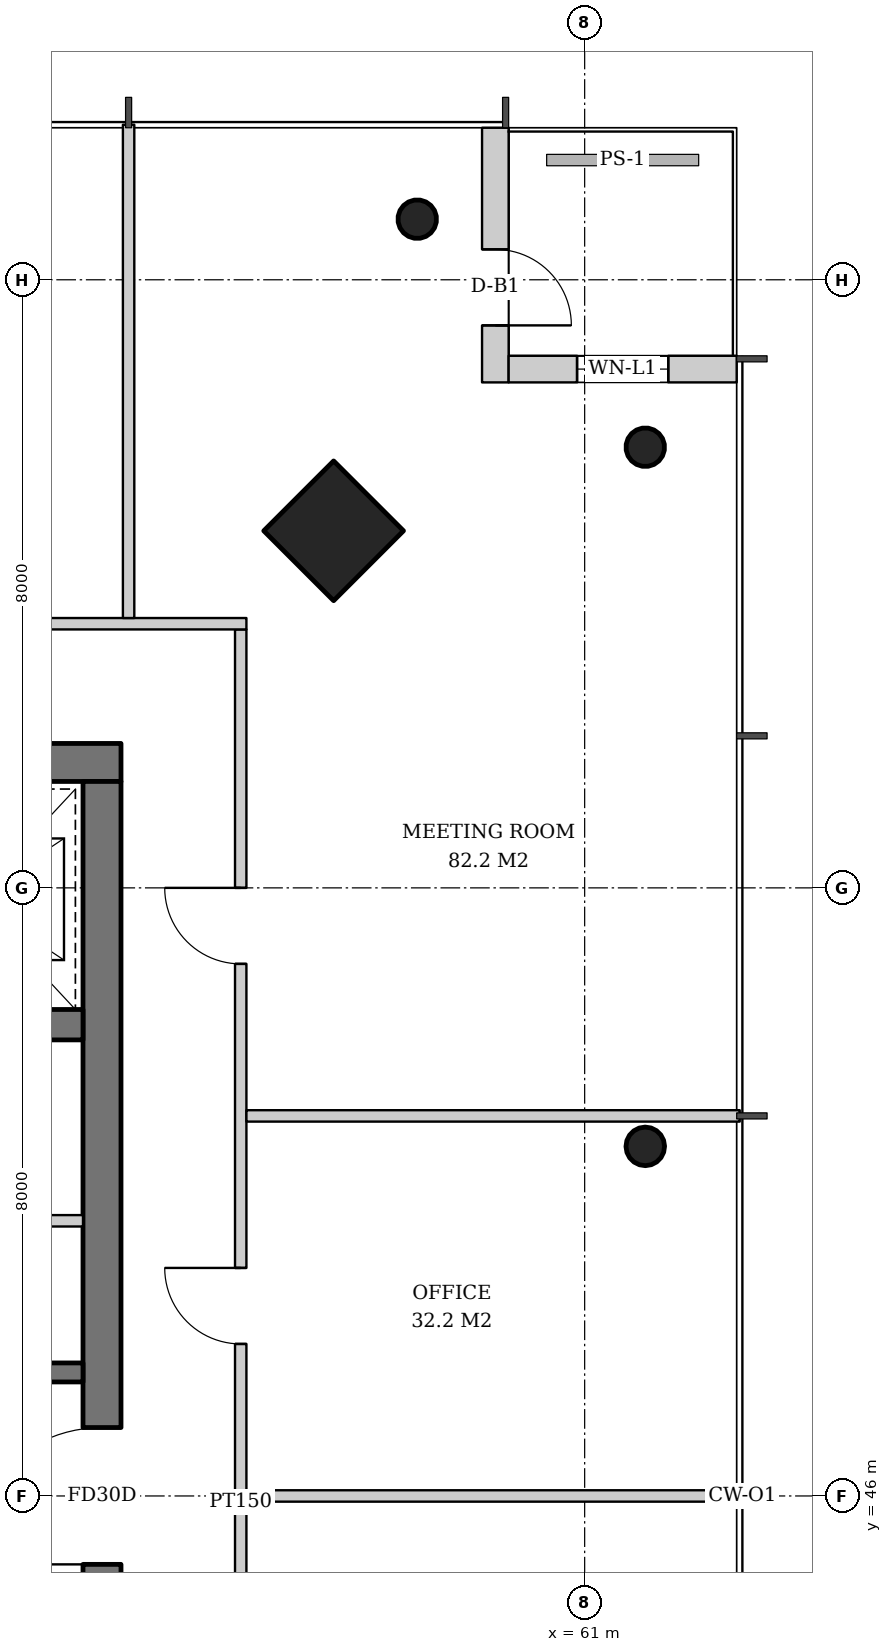
"""IFC4 building model, lengths in metres.
Left out: names, types, materials, properties, quantities, classifications, styles, units other than length and angle.
Written with IfcOpenShell. Run it as: python <this file> out.ifc"""

import sys

from ifc_helpers import new_model, si_unit, direction, frame, frame_2d, origin, origin_2d, place, context, subcontext, project, spatial, rectangle, hollow_circle, extrude, element, fill, save


model = new_model("IFC4")
c1 = context("Model", 3, precision=1e-05, world=origin(), true_north=direction((0.0, 1.0)))
c2 = subcontext(c1, "Body", "Model", "MODEL_VIEW")
j1 = project(units=[si_unit("LENGTHUNIT", "METRE"), si_unit("PLANEANGLEUNIT", "RADIAN")], contexts=[c1])
p1 = place(None, origin())
s1 = spatial("IfcSite", under=j1, at=p1, CompositionType="ELEMENT")
p2 = place(p1, origin())
s2 = spatial("IfcBuilding", under=s1, at=p2, CompositionType="ELEMENT")
p3 = place(p2, frame((0.0, 0.0, 245.2)))
s3 = spatial("IfcBuildingStorey", under=s2, at=p3, CompositionType="ELEMENT", Elevation=245.2)
p4 = place(p3, frame((57.736, 58.736, 0.0), z_axis=(-0.031898107953, -0.031898107953, 0.998981992539), x_axis=(0.707106781187, -0.707106781187, 0.0)))
e1 = element("IfcColumn", 1, at=p4, inside=s3, PredefinedType="COLUMN", context=c2, shape_type="SweptSolid", body=[
    extrude(rectangle(XDim=1.3, YDim=1.3, at=origin_2d()), origin(), (0.0, 0.0, 1.0), 3.804),
])
p5 = place(p3, frame((61.836, 59.836, 0.0), z_axis=(-0.031898107953, -0.031898107953, 0.998981992539), x_axis=(0.707106781187, -0.707106781187, 0.0)))
e2 = element("IfcColumn", 2, at=p5, inside=s3, PredefinedType="COLUMN", context=c2, shape_type="SweptSolid", body=[
    extrude(hollow_circle(Radius=0.254, WallThickness=0.02, at=origin_2d()), origin(), (0.0, 0.0, 1.0), 3.804),
])
p6 = place(p3, frame((61.836, 50.612, 0.0), z_axis=(-0.031912557129, -0.010594712125, 0.999434510497), x_axis=(0.315081783451, -0.949064523485, 0.0)))
e3 = element("IfcColumn", 3, at=p6, inside=s3, PredefinedType="COLUMN", context=c2, shape_type="SweptSolid", body=[
    extrude(hollow_circle(Radius=0.254, WallThickness=0.02, at=origin_2d()), origin(), (0.0, 0.0, 1.0), 3.802),
])
p7 = place(p3, frame((58.836, 62.836, 0.0), z_axis=(-0.031898107953, -0.031898107953, 0.998981992539), x_axis=(0.707106781187, -0.707106781187, 0.0)))
e4 = element("IfcColumn", 4, at=p7, inside=s3, PredefinedType="COLUMN", context=c2, shape_type="SweptSolid", body=[
    extrude(hollow_circle(Radius=0.254, WallThickness=0.02, at=origin_2d()), origin(), (0.0, 0.0, 1.0), 3.804),
])
p8 = place(p3, frame((35.1, 55.65, 0.0), z_axis=(0.0, 0.0, 1.0), x_axis=(1.0, 0.0, 0.0)))
e5 = element("IfcWall", 5, at=p8, inside=s3, PredefinedType="SHEAR", context=c2, shape_type="SweptSolid", body=[
    extrude(rectangle(XDim=19.8, YDim=0.5, at=frame_2d((9.9, 0.0))), origin(), (0.0, 0.0, 1.0), 3.8),
])
p9 = place(p8, frame((14.54, 0.0, 0.0)))
e6 = element("IfcOpeningElement", 6, at=p9, cuts=e5, PredefinedType="OPENING", context=c2, shape_type="SweptSolid", body=[
    extrude(rectangle(XDim=1.0, YDim=2.1, at=frame_2d((0.5, 1.05))), frame((0.0, 0.26, 0.0), z_axis=(0.0, -1.0, 0.0), x_axis=(1.0, 0.0, 0.0)), (0.0, 0.0, 1.0), 0.52),
])
p10 = place(p8, frame((0.96, 0.0, 0.0)))
e7 = element("IfcOpeningElement", 7, at=p10, cuts=e5, PredefinedType="OPENING", context=c2, shape_type="SweptSolid", body=[
    extrude(rectangle(XDim=1.0, YDim=2.1, at=frame_2d((0.5, 1.05))), frame((0.0, 0.26, 0.0), z_axis=(0.0, -1.0, 0.0), x_axis=(1.0, 0.0, 0.0)), (0.0, 0.0, 1.0), 0.52),
])
p11 = place(p8, frame((3.23, 0.0, 0.0)))
e8 = element("IfcOpeningElement", 8, at=p11, cuts=e5, PredefinedType="OPENING", context=c2, shape_type="SweptSolid", body=[
    extrude(rectangle(XDim=1.0, YDim=2.1, at=frame_2d((0.5, 1.05))), frame((0.0, 0.26, 0.0), z_axis=(0.0, -1.0, 0.0), x_axis=(1.0, 0.0, 0.0)), (0.0, 0.0, 1.0), 0.52),
])
p12 = place(p3, frame((54.65, 36.6, 0.0), z_axis=(0.0, 0.0, 1.0), x_axis=(0.0, 1.0, 0.0)))
e9 = element("IfcWall", 9, at=p12, inside=s3, PredefinedType="SHEAR", context=c2, shape_type="SweptSolid", body=[
    extrude(rectangle(XDim=18.8, YDim=0.5, at=frame_2d((9.4, 0.0))), origin(), (0.0, 0.0, 1.0), 3.8),
])
p13 = place(p12, frame((8.5, 0.0, 0.0)))
e10 = element("IfcOpeningElement", 10, at=p13, cuts=e9, PredefinedType="OPENING", context=c2, shape_type="SweptSolid", body=[
    extrude(rectangle(XDim=1.8, YDim=2.4, at=frame_2d((0.9, 1.2))), frame((0.0, 0.26, 0.0), z_axis=(0.0, -1.0, 0.0), x_axis=(1.0, 0.0, 0.0)), (0.0, 0.0, 1.0), 0.52),
])
p14 = place(p3, frame((35.6, 52.2, 0.0), z_axis=(0.0, 0.0, 1.0), x_axis=(1.0, 0.0, 0.0)))
e11 = element("IfcWall", 11, at=p14, inside=s3, PredefinedType="SHEAR", context=c2, shape_type="SweptSolid", body=[
    extrude(rectangle(XDim=18.8, YDim=0.4, at=frame_2d((9.4, 0.0))), origin(), (0.0, 0.0, 1.0), 3.8),
])
p15 = place(p3, frame((59.825, 64.0, 0.0), z_axis=(0.0, 0.0, 1.0), x_axis=(0.0, -1.0, 0.0)))
e12 = element("IfcWall", 12, at=p15, inside=s3, PredefinedType="SOLIDWALL", context=c2, shape_type="SweptSolid", body=[
    extrude(rectangle(XDim=3.35, YDim=0.35, at=frame_2d((1.675, 0.0))), origin(), (0.0, 0.0, 1.0), 3.62),
])
p16 = place(p15, frame((1.6, 0.0, 0.0)))
e13 = element("IfcOpeningElement", 13, at=p16, cuts=e12, PredefinedType="OPENING", context=c2, shape_type="SweptSolid", body=[
    extrude(rectangle(XDim=1.0, YDim=2.4, at=frame_2d((0.5, 1.2))), frame((0.0, 0.185, 0.0), z_axis=(0.0, -1.0, 0.0), x_axis=(1.0, 0.0, 0.0)), (0.0, 0.0, 1.0), 0.37),
])
p17 = place(p3, frame((60.0, 60.825, 0.0), z_axis=(0.0, 0.0, 1.0), x_axis=(1.0, 0.0, 0.0)))
e14 = element("IfcWall", 14, at=p17, inside=s3, PredefinedType="SOLIDWALL", context=c2, shape_type="SweptSolid", body=[
    extrude(rectangle(XDim=3.0, YDim=0.35, at=frame_2d((1.5, 0.0))), origin(), (0.0, 0.0, 1.0), 3.62),
])
p18 = place(p17, frame((0.9, 0.0, 0.6)))
e15 = element("IfcOpeningElement", 15, at=p18, cuts=e14, PredefinedType="OPENING", context=c2, shape_type="SweptSolid", body=[
    extrude(rectangle(XDim=1.2, YDim=2.55, at=frame_2d((0.6, 1.275))), frame((0.0, 0.185, 0.0), z_axis=(0.0, -1.0, 0.0), x_axis=(1.0, 0.0, 0.0)), (0.0, 0.0, 1.0), 0.37),
])
p19 = place(p3, frame((48.93, 47.625, 0.0), z_axis=(0.0, 0.0, 1.0), x_axis=(1.0, 0.0, 0.0)))
e16 = element("IfcWall", 16, at=p19, inside=s3, PredefinedType="SHEAR", context=c2, shape_type="SweptSolid", body=[
    extrude(rectangle(XDim=5.47, YDim=0.25, at=frame_2d((2.735, 0.0))), origin(), (0.0, 0.0, 1.0), 3.8),
])
p20 = place(p19, frame((0.78, 0.0, 0.0)))
e17 = element("IfcOpeningElement", 17, at=p20, cuts=e16, PredefinedType="OPENING", context=c2, shape_type="SweptSolid", body=[
    extrude(rectangle(XDim=1.0, YDim=2.1, at=frame_2d((0.5, 1.05))), frame((0.0, 0.135, 0.0), z_axis=(0.0, -1.0, 0.0), x_axis=(1.0, 0.0, 0.0)), (0.0, 0.0, 1.0), 0.27),
])
p21 = place(p19, frame((3.64, 0.0, 0.0)))
e18 = element("IfcOpeningElement", 18, at=p21, cuts=e16, PredefinedType="OPENING", context=c2, shape_type="SweptSolid", body=[
    extrude(rectangle(XDim=1.0, YDim=2.1, at=frame_2d((0.5, 1.05))), frame((0.0, 0.135, 0.0), z_axis=(0.0, -1.0, 0.0), x_axis=(1.0, 0.0, 0.0)), (0.0, 0.0, 1.0), 0.27),
])
p22 = place(p3, frame((51.74, 49.62, 0.0), z_axis=(0.0, 0.0, 1.0), x_axis=(1.0, 0.0, 0.0)))
e19 = element("IfcWall", 19, at=p22, inside=s3, PredefinedType="SOLIDWALL", context=c2, shape_type="SweptSolid", body=[
    extrude(rectangle(XDim=2.66, YDim=0.15, at=frame_2d((1.33, 0.0))), origin(), (0.0, 0.0, 1.0), 3.62),
])
p23 = place(p22, frame((0.83, 0.0, 0.0)))
e20 = element("IfcOpeningElement", 20, at=p23, cuts=e19, PredefinedType="OPENING", context=c2, shape_type="SweptSolid", body=[
    extrude(rectangle(XDim=1.0, YDim=2.1, at=frame_2d((0.5, 1.05))), frame((0.0, 0.085, 0.0), z_axis=(0.0, -1.0, 0.0), x_axis=(1.0, 0.0, 0.0)), (0.0, 0.0, 1.0), 0.17),
])
p24 = place(p3, frame((56.475, 34.45, 0.0), z_axis=(0.0, 0.0, 1.0), x_axis=(0.0, 1.0, 0.0)))
e21 = element("IfcWall", 21, at=p24, inside=s3, PredefinedType="PARTITIONING", context=c2, shape_type="SweptSolid", body=[
    extrude(rectangle(XDim=22.95, YDim=0.15, at=frame_2d((11.475, 0.0))), origin(), (0.0, 0.0, 1.0), 3.02),
])
p25 = place(p24, frame((3.55, 0.0, 0.0)))
e22 = element("IfcOpeningElement", 22, at=p25, cuts=e21, PredefinedType="OPENING", context=c2, shape_type="SweptSolid", body=[
    extrude(rectangle(XDim=1.0, YDim=2.1, at=frame_2d((0.5, 1.05))), frame((0.0, 0.085, 0.0), z_axis=(0.0, -1.0, 0.0), x_axis=(1.0, 0.0, 0.0)), (0.0, 0.0, 1.0), 0.17),
])
p26 = place(p24, frame((8.55, 0.0, 0.0)))
e23 = element("IfcOpeningElement", 23, at=p26, cuts=e21, PredefinedType="OPENING", context=c2, shape_type="SweptSolid", body=[
    extrude(rectangle(XDim=1.0, YDim=2.1, at=frame_2d((0.5, 1.05))), frame((0.0, 0.085, 0.0), z_axis=(0.0, -1.0, 0.0), x_axis=(1.0, 0.0, 0.0)), (0.0, 0.0, 1.0), 0.17),
])
p27 = place(p24, frame((13.55, 0.0, 0.0)))
e24 = element("IfcOpeningElement", 24, at=p27, cuts=e21, PredefinedType="OPENING", context=c2, shape_type="SweptSolid", body=[
    extrude(rectangle(XDim=1.0, YDim=2.1, at=frame_2d((0.5, 1.05))), frame((0.0, 0.085, 0.0), z_axis=(0.0, -1.0, 0.0), x_axis=(1.0, 0.0, 0.0)), (0.0, 0.0, 1.0), 0.17),
])
p28 = place(p24, frame((18.55, 0.0, 0.0)))
e25 = element("IfcOpeningElement", 25, at=p28, cuts=e21, PredefinedType="OPENING", context=c2, shape_type="SweptSolid", body=[
    extrude(rectangle(XDim=1.0, YDim=2.1, at=frame_2d((0.5, 1.05))), frame((0.0, 0.085, 0.0), z_axis=(0.0, -1.0, 0.0), x_axis=(1.0, 0.0, 0.0)), (0.0, 0.0, 1.0), 0.17),
])
for number, where, z_axis, x_axis in (
    (26, (56.55, 46.0, 0.0), (0.0, 0.0, 1.0), (1.0, 0.0, 0.0)),
    (27, (56.55, 51.0, 0.0), (0.0, 0.0, 1.0), (1.0, 0.0, 0.0)),
):
    element("IfcWall", number, at=place(p3, frame(where, z_axis=z_axis, x_axis=x_axis)), inside=s3, PredefinedType="PARTITIONING", context=c2, shape_type="SweptSolid", body=[
        extrude(rectangle(XDim=6.49, YDim=0.15, at=frame_2d((3.245, 0.0))), origin(), (0.0, 0.0, 1.0), 3.12),
    ])
p29 = place(p3, frame((56.55, 57.475, 0.0), z_axis=(0.0, 0.0, 1.0), x_axis=(-1.0, 0.0, 0.0)))
e28 = element("IfcWall", 28, at=p29, inside=s3, PredefinedType="PARTITIONING", context=c2, shape_type="SweptSolid", body=[
    extrude(rectangle(XDim=22.95, YDim=0.15, at=frame_2d((11.475, 0.0))), origin(), (0.0, 0.0, 1.0), 3.02),
])
p30 = place(p29, frame((3.55, 0.0, 0.0)))
e29 = element("IfcOpeningElement", 29, at=p30, cuts=e28, PredefinedType="OPENING", context=c2, shape_type="SweptSolid", body=[
    extrude(rectangle(XDim=1.0, YDim=2.1, at=frame_2d((0.5, 1.05))), frame((0.0, 0.085, 0.0), z_axis=(0.0, -1.0, 0.0), x_axis=(1.0, 0.0, 0.0)), (0.0, 0.0, 1.0), 0.17),
])
p31 = place(p29, frame((8.15, 0.0, 0.0)))
e30 = element("IfcOpeningElement", 30, at=p31, cuts=e28, PredefinedType="OPENING", context=c2, shape_type="SweptSolid", body=[
    extrude(rectangle(XDim=1.8, YDim=2.4, at=frame_2d((0.9, 1.2))), frame((0.0, 0.085, 0.0), z_axis=(0.0, -1.0, 0.0), x_axis=(1.0, 0.0, 0.0)), (0.0, 0.0, 1.0), 0.17),
])
p32 = place(p29, frame((18.55, 0.0, 0.0)))
e31 = element("IfcOpeningElement", 31, at=p32, cuts=e28, PredefinedType="OPENING", context=c2, shape_type="SweptSolid", body=[
    extrude(rectangle(XDim=1.0, YDim=2.1, at=frame_2d((0.5, 1.05))), frame((0.0, 0.085, 0.0), z_axis=(0.0, -1.0, 0.0), x_axis=(1.0, 0.0, 0.0)), (0.0, 0.0, 1.0), 0.17),
])
p33 = place(p3, frame((55.0, 57.55, 0.0), z_axis=(0.0, 0.0, 1.0), x_axis=(0.0, 1.0, 0.0)))
e32 = element("IfcWall", 32, at=p33, inside=s3, PredefinedType="PARTITIONING", context=c2, shape_type="SweptSolid", body=[
    extrude(rectangle(XDim=6.49, YDim=0.15, at=frame_2d((3.245, 0.0))), origin(), (0.0, 0.0, 1.0), 3.12),
])
p34 = place(p16, origin())
e33 = element("IfcDoor", 33, at=p34, inside=s3, OperationType="SINGLE_SWING_RIGHT", PredefinedType="DOOR", context=c2, shape_type="SweptSolid", body=[
    extrude(rectangle(XDim=1.0, YDim=2.4, at=frame_2d((0.5, 1.2))), frame((0.0, 0.025, 0.0), z_axis=(0.0, -1.0, 0.0), x_axis=(1.0, 0.0, 0.0)), (0.0, 0.0, 1.0), 0.05),
])
fill(e13, e33)
p35 = place(p18, origin())
e34 = element("IfcWindow", 34, at=p35, inside=s3, PartitioningType="SINGLE_PANEL", PredefinedType="WINDOW", context=c2, shape_type="SweptSolid", body=[
    extrude(rectangle(XDim=1.2, YDim=2.55, at=frame_2d((0.6, 1.275))), frame((0.0, 0.03, 0.0), z_axis=(0.0, -1.0, 0.0), x_axis=(1.0, 0.0, 0.0)), (0.0, 0.0, 1.0), 0.06),
])
fill(e15, e34)
p36 = place(p13, origin())
e35 = element("IfcDoor", 35, at=p36, inside=s3, OperationType="DOUBLE_DOOR_SINGLE_SWING", PredefinedType="DOOR", context=c2, shape_type="SweptSolid", body=[
    extrude(rectangle(XDim=1.8, YDim=2.4, at=frame_2d((0.9, 1.2))), frame((0.0, 0.025, 0.0), z_axis=(0.0, -1.0, 0.0), x_axis=(1.0, 0.0, 0.0)), (0.0, 0.0, 1.0), 0.05),
])
fill(e10, e35)
p37 = place(p27, origin())
e36 = element("IfcDoor", 36, at=p37, inside=s3, OperationType="SINGLE_SWING_RIGHT", PredefinedType="DOOR", context=c2, shape_type="SweptSolid", body=[
    extrude(rectangle(XDim=1.0, YDim=2.1, at=frame_2d((0.5, 1.05))), frame((0.0, 0.025, 0.0), z_axis=(0.0, -1.0, 0.0), x_axis=(1.0, 0.0, 0.0)), (0.0, 0.0, 1.0), 0.05),
])
fill(e24, e36)
p38 = place(p28, origin())
e37 = element("IfcDoor", 37, at=p38, inside=s3, OperationType="SINGLE_SWING_RIGHT", PredefinedType="DOOR", context=c2, shape_type="SweptSolid", body=[
    extrude(rectangle(XDim=1.0, YDim=2.1, at=frame_2d((0.5, 1.05))), frame((0.0, 0.025, 0.0), z_axis=(0.0, -1.0, 0.0), x_axis=(1.0, 0.0, 0.0)), (0.0, 0.0, 1.0), 0.05),
])
fill(e25, e37)
save(model, sys.argv[1])
